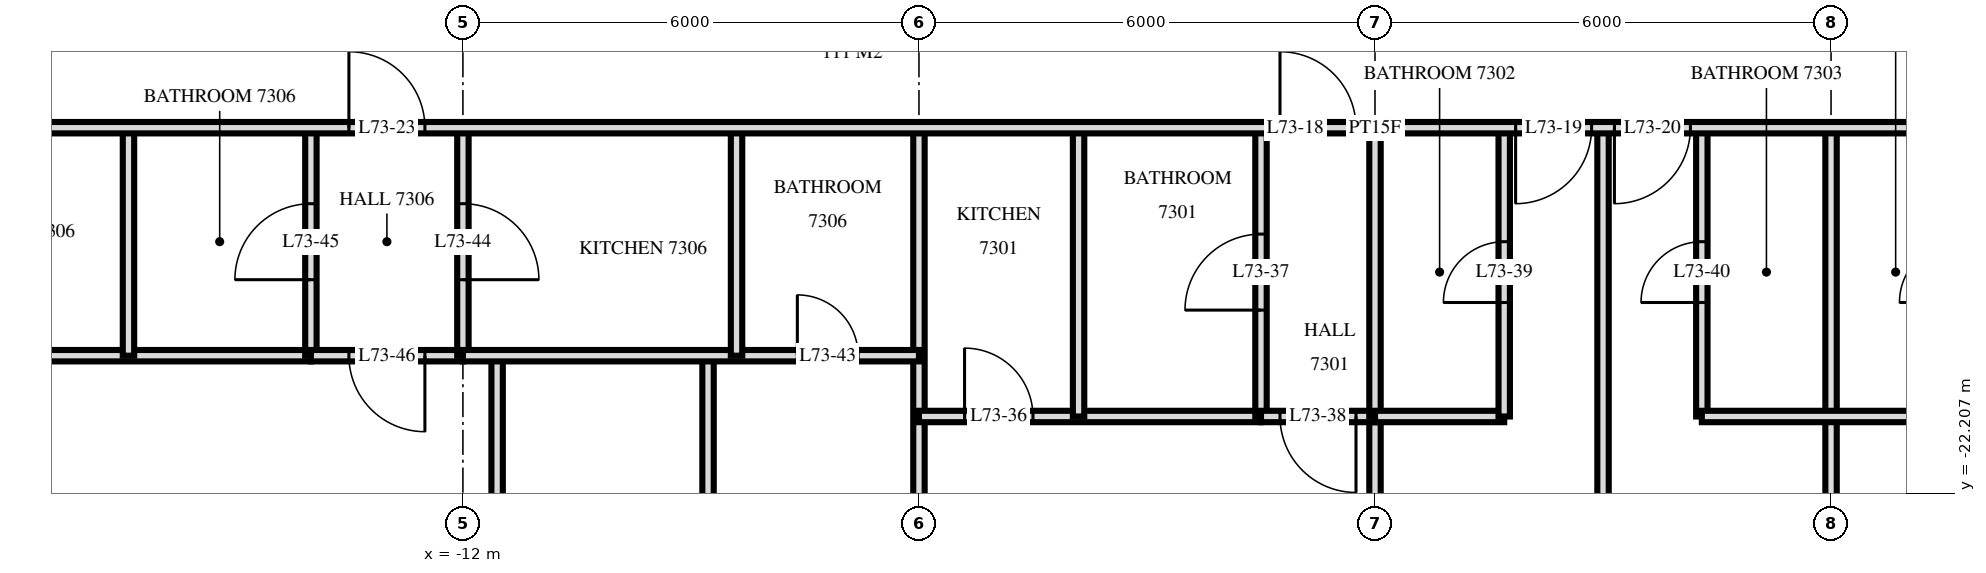
"""IFC4 building model, lengths in metres.
Left out: names, types, materials, properties, quantities, classifications, styles, units other than length and angle.
Written with IfcOpenShell. Run it as: python <this file> out.ifc"""

import sys

from ifc_helpers import new_model, si_unit, direction, frame, frame_2d, origin, place, context, subcontext, project, spatial, rectangle, extrude, element, fill, save


model = new_model("IFC4")
c1 = context("Model", 3, precision=1e-05, world=origin(), true_north=direction((0.0, 1.0)))
c2 = subcontext(c1, "Body", "Model", "MODEL_VIEW")
j1 = project(units=[si_unit("LENGTHUNIT", "METRE"), si_unit("PLANEANGLEUNIT", "RADIAN")], contexts=[c1])
p1 = place(None, origin())
s1 = spatial("IfcSite", under=j1, at=p1, CompositionType="ELEMENT")
p2 = place(p1, origin())
s2 = spatial("IfcBuilding", under=s1, at=p2, CompositionType="ELEMENT")
p3 = place(p2, frame((0.0, 0.0, 277.1)))
s3 = spatial("IfcBuildingStorey", under=s2, at=p3, CompositionType="ELEMENT", Elevation=277.1)
p4 = place(p3, frame((6.0, -33.62, 0.0), z_axis=(0.0, 0.0, 1.0), x_axis=(0.0, 1.0, 0.0)))
e1 = element("IfcWall", 1, at=p4, inside=s3, PredefinedType="PARTITIONING", context=c2, shape_type="SweptSolid", body=[
    extrude(rectangle(XDim=16.22, YDim=0.15, at=frame_2d((8.11, 0.0))), origin(), (0.0, 0.0, 1.0), 3.22),
])
p5 = place(p3, frame((4.3, -21.2, 0.0), z_axis=(0.0, 0.0, 1.0), x_axis=(0.0, 1.0, 0.0)))
e2 = element("IfcWall", 2, at=p5, inside=s3, PredefinedType="PARTITIONING", context=c2, shape_type="SweptSolid", body=[
    extrude(rectangle(XDim=3.8, YDim=0.15, at=frame_2d((1.9, 0.0))), origin(), (0.0, 0.0, 1.0), 3.22),
])
p6 = place(p5, frame((1.5, 0.0, 0.0)))
e3 = element("IfcOpeningElement", 3, at=p6, cuts=e2, PredefinedType="OPENING", context=c2, shape_type="SweptSolid", body=[
    extrude(rectangle(XDim=0.8, YDim=2.1, at=frame_2d((0.4, 1.05))), frame((0.0, 0.085, 0.0), z_axis=(0.0, -1.0, 0.0), x_axis=(1.0, 0.0, 0.0)), (0.0, 0.0, 1.0), 0.17),
])
p7 = place(p3, frame((3.0, -33.62, 0.0), z_axis=(0.0, 0.0, 1.0), x_axis=(0.0, 1.0, 0.0)))
e4 = element("IfcWall", 4, at=p7, inside=s3, PredefinedType="PARTITIONING", context=c2, shape_type="SweptSolid", body=[
    extrude(rectangle(XDim=16.22, YDim=0.15, at=frame_2d((8.11, 0.0))), origin(), (0.0, 0.0, 1.0), 3.22),
])
p8 = place(p3, frame((1.7, -21.2, 0.0), z_axis=(0.0, 0.0, 1.0), x_axis=(0.0, 1.0, 0.0)))
e5 = element("IfcWall", 5, at=p8, inside=s3, PredefinedType="PARTITIONING", context=c2, shape_type="SweptSolid", body=[
    extrude(rectangle(XDim=3.8, YDim=0.15, at=frame_2d((1.9, 0.0))), origin(), (0.0, 0.0, 1.0), 3.22),
])
p9 = place(p8, frame((1.5, 0.0, 0.0)))
e6 = element("IfcOpeningElement", 6, at=p9, cuts=e5, PredefinedType="OPENING", context=c2, shape_type="SweptSolid", body=[
    extrude(rectangle(XDim=0.8, YDim=2.1, at=frame_2d((0.4, 1.05))), frame((0.0, 0.085, 0.0), z_axis=(0.0, -1.0, 0.0), x_axis=(1.0, 0.0, 0.0)), (0.0, 0.0, 1.0), 0.17),
])
p10 = place(p3, frame((0.0, -21.2, 0.0), z_axis=(0.0, 0.0, 1.0), x_axis=(0.0, 1.0, 0.0)))
e7 = element("IfcWall", 7, at=p10, inside=s3, PredefinedType="PARTITIONING", context=c2, shape_type="SweptSolid", body=[
    extrude(rectangle(XDim=3.8, YDim=0.15, at=frame_2d((1.9, 0.0))), origin(), (0.0, 0.0, 1.0), 3.22),
])
p11 = place(p3, frame((0.0, -33.62, 0.0), z_axis=(0.0, 0.0, 1.0), x_axis=(0.0, 1.0, 0.0)))
e8 = element("IfcWall", 8, at=p11, inside=s3, PredefinedType="PARTITIONING", context=c2, shape_type="SweptSolid", body=[
    extrude(rectangle(XDim=12.42, YDim=0.15, at=frame_2d((6.21, 0.0))), origin(), (0.0, 0.0, 1.0), 3.22),
])
p12 = place(p3, frame((-1.5, -21.2, 0.0), z_axis=(0.0, 0.0, 1.0), x_axis=(0.0, 1.0, 0.0)))
e9 = element("IfcWall", 9, at=p12, inside=s3, PredefinedType="PARTITIONING", context=c2, shape_type="SweptSolid", body=[
    extrude(rectangle(XDim=3.8, YDim=0.15, at=frame_2d((1.9, 0.0))), origin(), (0.0, 0.0, 1.0), 3.22),
])
p13 = place(p12, frame((1.4, 0.0, 0.0)))
e10 = element("IfcOpeningElement", 10, at=p13, cuts=e9, PredefinedType="OPENING", context=c2, shape_type="SweptSolid", body=[
    extrude(rectangle(XDim=1.0, YDim=2.1, at=frame_2d((0.5, 1.05))), frame((0.0, 0.085, 0.0), z_axis=(0.0, -1.0, 0.0), x_axis=(1.0, 0.0, 0.0)), (0.0, 0.0, 1.0), 0.17),
])
p14 = place(p3, frame((-3.9, -21.2, 0.0), z_axis=(0.0, 0.0, 1.0), x_axis=(0.0, 1.0, 0.0)))
e11 = element("IfcWall", 11, at=p14, inside=s3, PredefinedType="PARTITIONING", context=c2, shape_type="SweptSolid", body=[
    extrude(rectangle(XDim=3.8, YDim=0.15, at=frame_2d((1.9, 0.0))), origin(), (0.0, 0.0, 1.0), 3.22),
])
p15 = place(p3, frame((-6.0, -33.62, 0.0), z_axis=(0.0, 0.0, 1.0), x_axis=(0.0, 1.0, 0.0)))
e12 = element("IfcWall", 12, at=p15, inside=s3, PredefinedType="PARTITIONING", context=c2, shape_type="SweptSolid", body=[
    extrude(rectangle(XDim=16.22, YDim=0.15, at=frame_2d((8.11, 0.0))), origin(), (0.0, 0.0, 1.0), 3.22),
])
p16 = place(p3, frame((-8.4, -20.4, 0.0), z_axis=(0.0, 0.0, 1.0), x_axis=(0.0, 1.0, 0.0)))
e13 = element("IfcWall", 13, at=p16, inside=s3, PredefinedType="PARTITIONING", context=c2, shape_type="SweptSolid", body=[
    extrude(rectangle(XDim=3.0, YDim=0.15, at=frame_2d((1.5, 0.0))), origin(), (0.0, 0.0, 1.0), 3.22),
])
p17 = place(p3, frame((-8.775, -33.62, 0.0), z_axis=(0.0, 0.0, 1.0), x_axis=(0.0, 1.0, 0.0)))
e14 = element("IfcWall", 14, at=p17, inside=s3, PredefinedType="PARTITIONING", context=c2, shape_type="SweptSolid", body=[
    extrude(rectangle(XDim=13.22, YDim=0.15, at=frame_2d((6.61, 0.0))), origin(), (0.0, 0.0, 1.0), 3.22),
])
p18 = place(p17, frame((6.07, 0.0, 0.0)))
e15 = element("IfcOpeningElement", 15, at=p18, cuts=e14, PredefinedType="OPENING", context=c2, shape_type="SweptSolid", body=[
    extrude(rectangle(XDim=0.9, YDim=2.1, at=frame_2d((0.45, 1.05))), frame((0.0, 0.085, 0.0), z_axis=(0.0, -1.0, 0.0), x_axis=(1.0, 0.0, 0.0)), (0.0, 0.0, 1.0), 0.17),
])
p19 = place(p3, frame((-11.55, -33.62, 0.0), z_axis=(0.0, 0.0, 1.0), x_axis=(0.0, 1.0, 0.0)))
e16 = element("IfcWall", 16, at=p19, inside=s3, PredefinedType="PARTITIONING", context=c2, shape_type="SweptSolid", body=[
    extrude(rectangle(XDim=13.22, YDim=0.15, at=frame_2d((6.61, 0.0))), origin(), (0.0, 0.0, 1.0), 3.22),
])
p20 = place(p19, frame((6.05, 0.0, 0.0)))
e17 = element("IfcOpeningElement", 17, at=p20, cuts=e16, PredefinedType="OPENING", context=c2, shape_type="SweptSolid", body=[
    extrude(rectangle(XDim=0.9, YDim=2.1, at=frame_2d((0.45, 1.05))), frame((0.0, 0.085, 0.0), z_axis=(0.0, -1.0, 0.0), x_axis=(1.0, 0.0, 0.0)), (0.0, 0.0, 1.0), 0.17),
])
p21 = place(p3, frame((-12.0, -20.4, 0.0), z_axis=(0.0, 0.0, 1.0), x_axis=(0.0, 1.0, 0.0)))
e18 = element("IfcWall", 18, at=p21, inside=s3, PredefinedType="PARTITIONING", context=c2, shape_type="SweptSolid", body=[
    extrude(rectangle(XDim=3.0, YDim=0.15, at=frame_2d((1.5, 0.0))), origin(), (0.0, 0.0, 1.0), 3.22),
])
p22 = place(p21, frame((1.0, 0.0, 0.0)))
e19 = element("IfcOpeningElement", 19, at=p22, cuts=e18, PredefinedType="OPENING", context=c2, shape_type="SweptSolid", body=[
    extrude(rectangle(XDim=1.0, YDim=2.1, at=frame_2d((0.5, 1.05))), frame((0.0, 0.085, 0.0), z_axis=(0.0, -1.0, 0.0), x_axis=(1.0, 0.0, 0.0)), (0.0, 0.0, 1.0), 0.17),
])
p23 = place(p3, frame((-14.0, -20.4, 0.0), z_axis=(0.0, 0.0, 1.0), x_axis=(0.0, 1.0, 0.0)))
e20 = element("IfcWall", 20, at=p23, inside=s3, PredefinedType="PARTITIONING", context=c2, shape_type="SweptSolid", body=[
    extrude(rectangle(XDim=3.0, YDim=0.15, at=frame_2d((1.5, 0.0))), origin(), (0.0, 0.0, 1.0), 3.22),
])
p24 = place(p23, frame((1.0, 0.0, 0.0)))
e21 = element("IfcOpeningElement", 21, at=p24, cuts=e20, PredefinedType="OPENING", context=c2, shape_type="SweptSolid", body=[
    extrude(rectangle(XDim=1.0, YDim=2.1, at=frame_2d((0.5, 1.05))), frame((0.0, 0.085, 0.0), z_axis=(0.0, -1.0, 0.0), x_axis=(1.0, 0.0, 0.0)), (0.0, 0.0, 1.0), 0.17),
])
p25 = place(p3, frame((-16.4, -20.4, 0.0), z_axis=(0.0, 0.0, 1.0), x_axis=(0.0, 1.0, 0.0)))
e22 = element("IfcWall", 22, at=p25, inside=s3, PredefinedType="PARTITIONING", context=c2, shape_type="SweptSolid", body=[
    extrude(rectangle(XDim=3.0, YDim=0.15, at=frame_2d((1.5, 0.0))), origin(), (0.0, 0.0, 1.0), 3.22),
])
p26 = place(p3, frame((-1.5, -21.2, 0.0), z_axis=(0.0, 0.0, 1.0), x_axis=(1.0, 0.0, 0.0)))
e23 = element("IfcWall", 23, at=p26, inside=s3, PredefinedType="PARTITIONING", context=c2, shape_type="SweptSolid", body=[
    extrude(rectangle(XDim=1.5, YDim=0.15, at=frame_2d((0.75, 0.0))), origin(), (0.0, 0.0, 1.0), 3.22),
])
p27 = place(p26, frame((0.25, 0.0, 0.0)))
e24 = element("IfcOpeningElement", 24, at=p27, cuts=e23, PredefinedType="OPENING", context=c2, shape_type="SweptSolid", body=[
    extrude(rectangle(XDim=1.0, YDim=2.1, at=frame_2d((0.5, 1.05))), frame((0.0, 0.085, 0.0), z_axis=(0.0, -1.0, 0.0), x_axis=(1.0, 0.0, 0.0)), (0.0, 0.0, 1.0), 0.17),
])
p28 = place(p3, frame((-6.0, -21.2, 0.0), z_axis=(0.0, 0.0, 1.0), x_axis=(1.0, 0.0, 0.0)))
e25 = element("IfcWall", 25, at=p28, inside=s3, PredefinedType="PARTITIONING", context=c2, shape_type="SweptSolid", body=[
    extrude(rectangle(XDim=4.5, YDim=0.15, at=frame_2d((2.25, 0.0))), origin(), (0.0, 0.0, 1.0), 3.22),
])
p29 = place(p28, frame((0.6, 0.0, 0.0)))
e26 = element("IfcOpeningElement", 26, at=p29, cuts=e25, PredefinedType="OPENING", context=c2, shape_type="SweptSolid", body=[
    extrude(rectangle(XDim=0.9, YDim=2.1, at=frame_2d((0.45, 1.05))), frame((0.0, 0.085, 0.0), z_axis=(0.0, -1.0, 0.0), x_axis=(1.0, 0.0, 0.0)), (0.0, 0.0, 1.0), 0.17),
])
p30 = place(p3, frame((0.0, -21.2, 0.0), z_axis=(0.0, 0.0, 1.0), x_axis=(1.0, 0.0, 0.0)))
e27 = element("IfcWall", 27, at=p30, inside=s3, PredefinedType="PARTITIONING", context=c2, shape_type="SweptSolid", body=[
    extrude(rectangle(XDim=1.7, YDim=0.15, at=frame_2d((0.85, 0.0))), origin(), (0.0, 0.0, 1.0), 3.22),
])
p31 = place(p3, frame((4.3, -21.2, 0.0), z_axis=(0.0, 0.0, 1.0), x_axis=(1.0, 0.0, 0.0)))
e28 = element("IfcWall", 28, at=p31, inside=s3, PredefinedType="PARTITIONING", context=c2, shape_type="SweptSolid", body=[
    extrude(rectangle(XDim=3.4, YDim=0.15, at=frame_2d((1.7, 0.0))), origin(), (0.0, 0.0, 1.0), 3.22),
])
p32 = place(p3, frame((-14.0, -20.4, 0.0), z_axis=(0.0, 0.0, 1.0), x_axis=(1.0, 0.0, 0.0)))
e29 = element("IfcWall", 29, at=p32, inside=s3, PredefinedType="PARTITIONING", context=c2, shape_type="SweptSolid", body=[
    extrude(rectangle(XDim=2.0, YDim=0.15, at=frame_2d((1.0, 0.0))), origin(), (0.0, 0.0, 1.0), 3.22),
])
p33 = place(p32, frame((0.5, 0.0, 0.0)))
e30 = element("IfcOpeningElement", 30, at=p33, cuts=e29, PredefinedType="OPENING", context=c2, shape_type="SweptSolid", body=[
    extrude(rectangle(XDim=1.0, YDim=2.1, at=frame_2d((0.5, 1.05))), frame((0.0, 0.085, 0.0), z_axis=(0.0, -1.0, 0.0), x_axis=(1.0, 0.0, 0.0)), (0.0, 0.0, 1.0), 0.17),
])
p34 = place(p3, frame((-22.92, -20.4, 0.0), z_axis=(0.0, 0.0, 1.0), x_axis=(1.0, 0.0, 0.0)))
e31 = element("IfcWall", 31, at=p34, inside=s3, PredefinedType="PARTITIONING", context=c2, shape_type="SweptSolid", body=[
    extrude(rectangle(XDim=8.92, YDim=0.15, at=frame_2d((4.46, 0.0))), origin(), (0.0, 0.0, 1.0), 3.22),
])
p35 = place(p3, frame((-12.0, -20.4, 0.0), z_axis=(0.0, 0.0, 1.0), x_axis=(1.0, 0.0, 0.0)))
e32 = element("IfcWall", 32, at=p35, inside=s3, PredefinedType="PARTITIONING", context=c2, shape_type="SweptSolid", body=[
    extrude(rectangle(XDim=6.0, YDim=0.15, at=frame_2d((3.0, 0.0))), origin(), (0.0, 0.0, 1.0), 3.22),
])
p36 = place(p35, frame((4.4, 0.0, 0.0)))
e33 = element("IfcOpeningElement", 33, at=p36, cuts=e32, PredefinedType="OPENING", context=c2, shape_type="SweptSolid", body=[
    extrude(rectangle(XDim=0.8, YDim=2.1, at=frame_2d((0.4, 1.05))), frame((0.0, 0.085, 0.0), z_axis=(0.0, -1.0, 0.0), x_axis=(1.0, 0.0, 0.0)), (0.0, 0.0, 1.0), 0.17),
])
p37 = place(p3, frame((-22.92, -17.4, 0.0), z_axis=(0.0, 0.0, 1.0), x_axis=(1.0, 0.0, 0.0)))
e34 = element("IfcWall", 34, at=p37, inside=s3, PredefinedType="PARTITIONING", context=c2, shape_type="SweptSolid", body=[
    extrude(rectangle(XDim=45.84, YDim=0.15, at=frame_2d((22.92, 0.0))), origin(), (0.0, 0.0, 1.0), 3.22),
])
p38 = place(p37, frame((21.67, 0.0, 0.0)))
e35 = element("IfcOpeningElement", 35, at=p38, cuts=e34, PredefinedType="OPENING", context=c2, shape_type="SweptSolid", body=[
    extrude(rectangle(XDim=1.0, YDim=2.1, at=frame_2d((0.5, 1.05))), frame((0.0, 0.085, 0.0), z_axis=(0.0, -1.0, 0.0), x_axis=(1.0, 0.0, 0.0)), (0.0, 0.0, 1.0), 0.17),
])
p39 = place(p37, frame((24.77, 0.0, 0.0)))
e36 = element("IfcOpeningElement", 36, at=p39, cuts=e34, PredefinedType="OPENING", context=c2, shape_type="SweptSolid", body=[
    extrude(rectangle(XDim=1.0, YDim=2.1, at=frame_2d((0.5, 1.05))), frame((0.0, 0.085, 0.0), z_axis=(0.0, -1.0, 0.0), x_axis=(1.0, 0.0, 0.0)), (0.0, 0.0, 1.0), 0.17),
])
p40 = place(p37, frame((26.07, 0.0, 0.0)))
e37 = element("IfcOpeningElement", 37, at=p40, cuts=e34, PredefinedType="OPENING", context=c2, shape_type="SweptSolid", body=[
    extrude(rectangle(XDim=1.0, YDim=2.1, at=frame_2d((0.5, 1.05))), frame((0.0, 0.085, 0.0), z_axis=(0.0, -1.0, 0.0), x_axis=(1.0, 0.0, 0.0)), (0.0, 0.0, 1.0), 0.17),
])
p41 = place(p37, frame((30.77, 0.0, 0.0)))
e38 = element("IfcOpeningElement", 38, at=p41, cuts=e34, PredefinedType="OPENING", context=c2, shape_type="SweptSolid", body=[
    extrude(rectangle(XDim=1.0, YDim=2.1, at=frame_2d((0.5, 1.05))), frame((0.0, 0.085, 0.0), z_axis=(0.0, -1.0, 0.0), x_axis=(1.0, 0.0, 0.0)), (0.0, 0.0, 1.0), 0.17),
])
p42 = place(p37, frame((32.07, 0.0, 0.0)))
e39 = element("IfcOpeningElement", 39, at=p42, cuts=e34, PredefinedType="OPENING", context=c2, shape_type="SweptSolid", body=[
    extrude(rectangle(XDim=1.0, YDim=2.1, at=frame_2d((0.5, 1.05))), frame((0.0, 0.085, 0.0), z_axis=(0.0, -1.0, 0.0), x_axis=(1.0, 0.0, 0.0)), (0.0, 0.0, 1.0), 0.17),
])
p43 = place(p37, frame((9.42, 0.0, 0.0)))
e40 = element("IfcOpeningElement", 40, at=p43, cuts=e34, PredefinedType="OPENING", context=c2, shape_type="SweptSolid", body=[
    extrude(rectangle(XDim=1.0, YDim=2.1, at=frame_2d((0.5, 1.05))), frame((0.0, 0.085, 0.0), z_axis=(0.0, -1.0, 0.0), x_axis=(1.0, 0.0, 0.0)), (0.0, 0.0, 1.0), 0.17),
])
p44 = place(p37, frame((2.67, 0.0, 0.0)))
e41 = element("IfcOpeningElement", 41, at=p44, cuts=e34, PredefinedType="OPENING", context=c2, shape_type="SweptSolid", body=[
    extrude(rectangle(XDim=1.0, YDim=2.1, at=frame_2d((0.5, 1.05))), frame((0.0, 0.085, 0.0), z_axis=(0.0, -1.0, 0.0), x_axis=(1.0, 0.0, 0.0)), (0.0, 0.0, 1.0), 0.17),
])
p45 = place(p37, frame((37.82, 0.0, 0.0)))
e42 = element("IfcOpeningElement", 42, at=p45, cuts=e34, PredefinedType="OPENING", context=c2, shape_type="SweptSolid", body=[
    extrude(rectangle(XDim=1.0, YDim=2.1, at=frame_2d((0.5, 1.05))), frame((0.0, 0.085, 0.0), z_axis=(0.0, -1.0, 0.0), x_axis=(1.0, 0.0, 0.0)), (0.0, 0.0, 1.0), 0.17),
])
p46 = place(p38, origin())
e43 = element("IfcDoor", 43, at=p46, inside=s3, OperationType="SINGLE_SWING_RIGHT", PredefinedType="DOOR", context=c2, shape_type="SweptSolid", body=[
    extrude(rectangle(XDim=1.0, YDim=2.1, at=frame_2d((0.5, 1.05))), frame((0.0, 0.025, 0.0), z_axis=(0.0, -1.0, 0.0), x_axis=(1.0, 0.0, 0.0)), (0.0, 0.0, 1.0), 0.05),
])
fill(e35, e43)
p47 = place(p39, frame((0.5, 0.0, 0.0), z_axis=(0.0, 0.0, 1.0), x_axis=(-1.0, 0.0, 0.0)))
e44 = element("IfcDoor", 44, at=p47, inside=s3, OperationType="SINGLE_SWING_LEFT", PredefinedType="DOOR", context=c2, shape_type="SweptSolid", body=[
    extrude(rectangle(XDim=1.0, YDim=2.1, at=frame_2d((0.0, 1.05))), frame((0.0, -0.025, 0.0), z_axis=(0.0, 1.0, 0.0), x_axis=(-1.0, 0.0, 0.0)), (0.0, 0.0, 1.0), 0.05),
])
fill(e36, e44)
p48 = place(p40, frame((0.5, 0.0, 0.0), z_axis=(0.0, 0.0, 1.0), x_axis=(-1.0, 0.0, 0.0)))
e45 = element("IfcDoor", 45, at=p48, inside=s3, OperationType="SINGLE_SWING_LEFT", PredefinedType="DOOR", context=c2, shape_type="SweptSolid", body=[
    extrude(rectangle(XDim=1.0, YDim=2.1, at=frame_2d((0.0, 1.05))), frame((0.0, -0.025, 0.0), z_axis=(0.0, 1.0, 0.0), x_axis=(-1.0, 0.0, 0.0)), (0.0, 0.0, 1.0), 0.05),
])
fill(e37, e45)
p49 = place(p43, origin())
e46 = element("IfcDoor", 46, at=p49, inside=s3, OperationType="SINGLE_SWING_RIGHT", PredefinedType="DOOR", context=c2, shape_type="SweptSolid", body=[
    extrude(rectangle(XDim=1.0, YDim=2.1, at=frame_2d((0.5, 1.05))), frame((0.0, 0.025, 0.0), z_axis=(0.0, -1.0, 0.0), x_axis=(1.0, 0.0, 0.0)), (0.0, 0.0, 1.0), 0.05),
])
fill(e40, e46)
p50 = place(p29, origin())
e47 = element("IfcDoor", 47, at=p50, inside=s3, OperationType="SINGLE_SWING_RIGHT", PredefinedType="DOOR", context=c2, shape_type="SweptSolid", body=[
    extrude(rectangle(XDim=0.9, YDim=2.1, at=frame_2d((0.45, 1.05))), frame((0.0, 0.025, 0.0), z_axis=(0.0, -1.0, 0.0), x_axis=(1.0, 0.0, 0.0)), (0.0, 0.0, 1.0), 0.05),
])
fill(e26, e47)
p51 = place(p13, origin())
e48 = element("IfcDoor", 48, at=p51, inside=s3, OperationType="SINGLE_SWING_RIGHT", PredefinedType="DOOR", context=c2, shape_type="SweptSolid", body=[
    extrude(rectangle(XDim=1.0, YDim=2.1, at=frame_2d((0.5, 1.05))), frame((0.0, 0.025, 0.0), z_axis=(0.0, -1.0, 0.0), x_axis=(1.0, 0.0, 0.0)), (0.0, 0.0, 1.0), 0.05),
])
fill(e10, e48)
p52 = place(p27, frame((0.5, 0.0, 0.0), z_axis=(0.0, 0.0, 1.0), x_axis=(-1.0, 0.0, 0.0)))
e49 = element("IfcDoor", 49, at=p52, inside=s3, OperationType="SINGLE_SWING_RIGHT", PredefinedType="DOOR", context=c2, shape_type="SweptSolid", body=[
    extrude(rectangle(XDim=1.0, YDim=2.1, at=frame_2d((0.0, 1.05))), frame((0.0, -0.025, 0.0), z_axis=(0.0, 1.0, 0.0), x_axis=(-1.0, 0.0, 0.0)), (0.0, 0.0, 1.0), 0.05),
])
fill(e24, e49)
p53 = place(p9, origin())
e50 = element("IfcDoor", 50, at=p53, inside=s3, OperationType="SINGLE_SWING_RIGHT", PredefinedType="DOOR", context=c2, shape_type="SweptSolid", body=[
    extrude(rectangle(XDim=0.8, YDim=2.1, at=frame_2d((0.4, 1.05))), frame((0.0, 0.025, 0.0), z_axis=(0.0, -1.0, 0.0), x_axis=(1.0, 0.0, 0.0)), (0.0, 0.0, 1.0), 0.05),
])
fill(e6, e50)
p54 = place(p6, origin())
e51 = element("IfcDoor", 51, at=p54, inside=s3, OperationType="SINGLE_SWING_RIGHT", PredefinedType="DOOR", context=c2, shape_type="SweptSolid", body=[
    extrude(rectangle(XDim=0.8, YDim=2.1, at=frame_2d((0.4, 1.05))), frame((0.0, 0.025, 0.0), z_axis=(0.0, -1.0, 0.0), x_axis=(1.0, 0.0, 0.0)), (0.0, 0.0, 1.0), 0.05),
])
fill(e3, e51)
p55 = place(p36, origin())
e52 = element("IfcDoor", 52, at=p55, inside=s3, OperationType="SINGLE_SWING_RIGHT", PredefinedType="DOOR", context=c2, shape_type="SweptSolid", body=[
    extrude(rectangle(XDim=0.8, YDim=2.1, at=frame_2d((0.4, 1.05))), frame((0.0, 0.025, 0.0), z_axis=(0.0, -1.0, 0.0), x_axis=(1.0, 0.0, 0.0)), (0.0, 0.0, 1.0), 0.05),
])
fill(e33, e52)
p56 = place(p22, frame((0.5, 0.0, 0.0), z_axis=(0.0, 0.0, 1.0), x_axis=(-1.0, 0.0, 0.0)))
e53 = element("IfcDoor", 53, at=p56, inside=s3, OperationType="SINGLE_SWING_LEFT", PredefinedType="DOOR", context=c2, shape_type="SweptSolid", body=[
    extrude(rectangle(XDim=1.0, YDim=2.1, at=frame_2d((0.0, 1.05))), frame((0.0, -0.025, 0.0), z_axis=(0.0, 1.0, 0.0), x_axis=(-1.0, 0.0, 0.0)), (0.0, 0.0, 1.0), 0.05),
])
fill(e19, e53)
p57 = place(p24, origin())
e54 = element("IfcDoor", 54, at=p57, inside=s3, OperationType="SINGLE_SWING_RIGHT", PredefinedType="DOOR", context=c2, shape_type="SweptSolid", body=[
    extrude(rectangle(XDim=1.0, YDim=2.1, at=frame_2d((0.5, 1.05))), frame((0.0, 0.025, 0.0), z_axis=(0.0, -1.0, 0.0), x_axis=(1.0, 0.0, 0.0)), (0.0, 0.0, 1.0), 0.05),
])
fill(e21, e54)
p58 = place(p33, frame((0.5, 0.0, 0.0), z_axis=(0.0, 0.0, 1.0), x_axis=(-1.0, 0.0, 0.0)))
e55 = element("IfcDoor", 55, at=p58, inside=s3, OperationType="SINGLE_SWING_RIGHT", PredefinedType="DOOR", context=c2, shape_type="SweptSolid", body=[
    extrude(rectangle(XDim=1.0, YDim=2.1, at=frame_2d((0.0, 1.05))), frame((0.0, -0.025, 0.0), z_axis=(0.0, 1.0, 0.0), x_axis=(-1.0, 0.0, 0.0)), (0.0, 0.0, 1.0), 0.05),
])
fill(e30, e55)
save(model, sys.argv[1])
